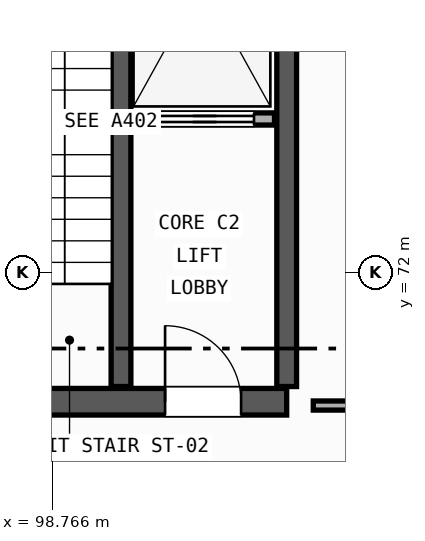
"""IFC4 building model, lengths in metres.
Left out: names, types, materials, properties, quantities, classifications, styles, units other than length and angle.
Written with IfcOpenShell. Run it as: python <this file> out.ifc"""

import sys

from ifc_helpers import new_model, si_unit, direction, frame, frame_2d, origin, place, context, subcontext, project, spatial, rectangle, extrude, element, fill, save


model = new_model("IFC4")
c1 = context("Model", 3, precision=1e-05, world=origin(), true_north=direction((0.0, 1.0)))
c2 = subcontext(c1, "Body", "Model", "MODEL_VIEW")
j1 = project(units=[si_unit("LENGTHUNIT", "METRE"), si_unit("PLANEANGLEUNIT", "RADIAN")], contexts=[c1])
p1 = place(None, origin())
s1 = spatial("IfcSite", under=j1, at=p1, CompositionType="ELEMENT")
p2 = place(p1, origin())
s2 = spatial("IfcBuilding", under=s1, at=p2, CompositionType="ELEMENT")
p3 = place(p2, origin())
s3 = spatial("IfcBuildingStorey", under=s2, at=p3, CompositionType="ELEMENT", Elevation=0.0)
p4 = place(p3, frame((96.45, 70.3, 0.0), z_axis=(0.0, 0.0, 1.0), x_axis=(1.0, 0.0, 0.0)))
e1 = element("IfcWall", 1, at=p4, inside=s3, PredefinedType="SHEAR", context=c2, shape_type="SweptSolid", body=[
    extrude(rectangle(XDim=5.4, YDim=0.35, at=frame_2d((2.7, 0.0))), origin(), (0.0, 0.0, 1.0), 5.07),
])
p5 = place(p4, frame((0.95, 0.0, 0.0)))
e2 = element("IfcOpeningElement", 2, at=p5, cuts=e1, PredefinedType="OPENING", context=c2, shape_type="SweptSolid", body=[
    extrude(rectangle(XDim=1.05, YDim=2.1, at=frame_2d((0.525, 1.05))), frame((0.0, 0.185, 0.0), z_axis=(0.0, -1.0, 0.0), x_axis=(1.0, 0.0, 0.0)), (0.0, 0.0, 1.0), 0.37),
])
p6 = place(p4, frame((3.8, 0.0, 0.0)))
e3 = element("IfcOpeningElement", 3, at=p6, cuts=e1, PredefinedType="OPENING", context=c2, shape_type="SweptSolid", body=[
    extrude(rectangle(XDim=1.0, YDim=2.15, at=frame_2d((0.5, 1.075))), frame((0.0, 0.185, 0.0), z_axis=(0.0, -1.0, 0.0), x_axis=(1.0, 0.0, 0.0)), (0.0, 0.0, 1.0), 0.37),
])
for number, where, z_axis, x_axis in (
    (4, (101.85, 70.5, 0.0), (0.0, 0.0, 1.0), (0.0, 1.0, 0.0)),
    (5, (99.67, 70.5, 0.0), (0.0, 0.0, 1.0), (0.0, 1.0, 0.0)),
):
    element("IfcWall", number, at=place(p3, frame(where, z_axis=z_axis, x_axis=x_axis)), inside=s3, PredefinedType="SHEAR", context=c2, shape_type="SweptSolid", body=[
        extrude(rectangle(XDim=6.95, YDim=0.26, at=frame_2d((3.475, 0.0))), origin(), (0.0, 0.0, 1.0), 5.07),
    ])
p7 = place(p3, frame((99.85, 74.02, 0.0), z_axis=(0.0, 0.0, 1.0), x_axis=(1.0, 0.0, 0.0)))
e6 = element("IfcWall", 6, at=p7, inside=s3, PredefinedType="PARTITIONING", context=c2, shape_type="SweptSolid", body=[
    extrude(rectangle(XDim=1.84, YDim=0.16, at=frame_2d((0.92, 0.0))), origin(), (0.0, 0.0, 1.0), 3.6),
])
p8 = place(p7, frame((0.27, 0.0, 0.0)))
e7 = element("IfcOpeningElement", 7, at=p8, cuts=e6, PredefinedType="OPENING", context=c2, shape_type="SweptSolid", body=[
    extrude(rectangle(XDim=1.3, YDim=2.2, at=frame_2d((0.65, 1.1))), frame((0.0, 0.09, 0.0), z_axis=(0.0, -1.0, 0.0), x_axis=(1.0, 0.0, 0.0)), (0.0, 0.0, 1.0), 0.18),
])
p9 = place(p3, frame((102.2, 70.25, 0.0), z_axis=(0.0, 0.0, 1.0), x_axis=(1.0, 0.0, 0.0)))
e8 = element("IfcWall", 8, at=p9, inside=s3, PredefinedType="PARTITIONING", context=c2, shape_type="SweptSolid", body=[
    extrude(rectangle(XDim=7.8, YDim=0.12, at=frame_2d((3.9, 0.0))), origin(), (0.0, 0.0, 1.0), 4.29),
])
p10 = place(p9, frame((3.225, 0.0, 0.0)))
e9 = element("IfcOpeningElement", 9, at=p10, cuts=e8, PredefinedType="OPENING", context=c2, shape_type="SweptSolid", body=[
    extrude(rectangle(XDim=1.35, YDim=2.25, at=frame_2d((0.675, 1.125))), frame((0.0, 0.07, 0.0), z_axis=(0.0, -1.0, 0.0), x_axis=(1.0, 0.0, 0.0)), (0.0, 0.0, 1.0), 0.14),
])
p11 = place(p8, origin())
e10 = element("IfcDoor", 10, at=p11, inside=s3, OperationType="SLIDING_TO_LEFT", PredefinedType="DOOR", context=c2, shape_type="SweptSolid", body=[
    extrude(rectangle(XDim=1.3, YDim=2.2, at=frame_2d((0.65, 1.1))), frame((0.0, 0.025, 0.0), z_axis=(0.0, -1.0, 0.0), x_axis=(1.0, 0.0, 0.0)), (0.0, 0.0, 1.0), 0.05),
])
fill(e7, e10)
p12 = place(p6, origin())
e11 = element("IfcDoor", 11, at=p12, inside=s3, OperationType="SINGLE_SWING_LEFT", PredefinedType="DOOR", context=c2, shape_type="SweptSolid", body=[
    extrude(rectangle(XDim=1.0, YDim=2.15, at=frame_2d((0.5, 1.075))), frame((0.0, 0.025, 0.0), z_axis=(0.0, -1.0, 0.0), x_axis=(1.0, 0.0, 0.0)), (0.0, 0.0, 1.0), 0.05),
])
fill(e3, e11)
save(model, sys.argv[1])
